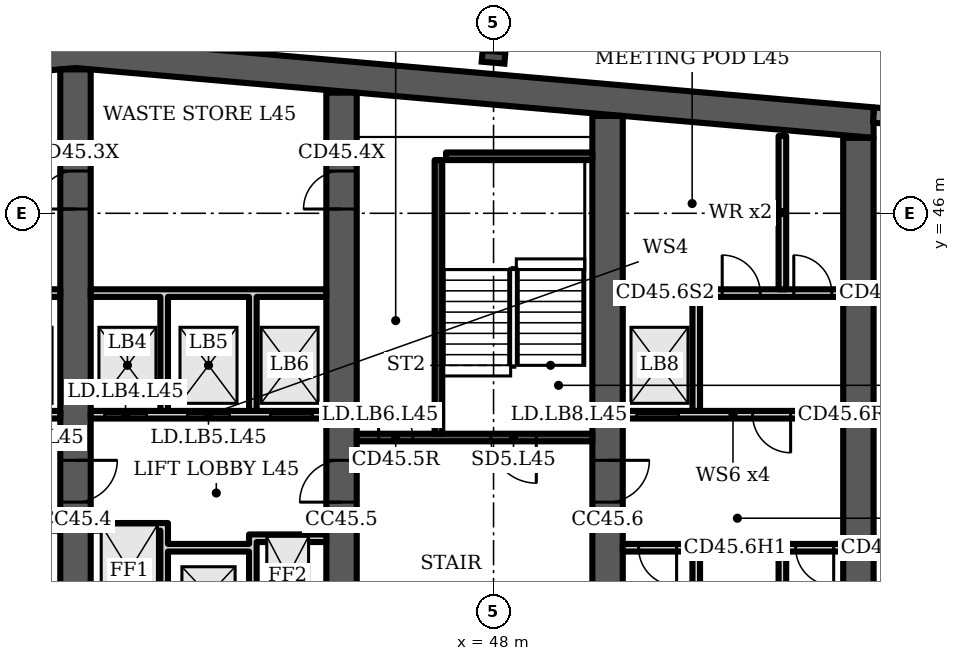
"""IFC4 building model, lengths in metres.
Left out: names, types, materials, properties, quantities, classifications, styles, units other than length and angle.
Written with IfcOpenShell. Run it as: python <this file> out.ifc"""

import sys

from ifc_helpers import new_model, si_unit, direction, frame, frame_2d, origin, origin_2d, place, context, subcontext, project, spatial, polyline, rectangle, i_section, outline, extrude, element, fill, save


model = new_model("IFC4")
c1 = context("Model", 3, precision=1e-05, world=origin(), true_north=direction((0.0, 1.0)))
c2 = subcontext(c1, "Body", "Model", "MODEL_VIEW")
j1 = project(units=[si_unit("LENGTHUNIT", "METRE"), si_unit("PLANEANGLEUNIT", "RADIAN")], contexts=[c1])
p1 = place(None, origin())
s1 = spatial("IfcSite", under=j1, at=p1, CompositionType="ELEMENT")
p2 = place(p1, origin())
s2 = spatial("IfcBuilding", under=s1, at=p2, CompositionType="ELEMENT")
p3 = place(p2, frame((0.0, 0.0, 184.3)))
s3 = spatial("IfcBuildingStorey", under=s2, at=p3, CompositionType="ELEMENT", Elevation=184.3)
p4 = place(p3, frame((0.0, 0.0, -0.0)))
e1 = element("IfcWall", 1, at=p4, inside=s3, PredefinedType="SHEAR", context=c2, shape_type="SweptSolid", body=[
    extrude(outline(polyline([(16.0, 47.984), (37.0, 49.822), (58.0, 47.984), (58.0, 48.787), (37.0, 50.625), (16.0, 48.787), (16.0, 47.984)])), origin(), (0.0, 0.0, 1.0), 3.6),
])
p5 = place(p3, frame((37.0, 34.8, 0.0), z_axis=(0.0, 0.0, 1.0), x_axis=(0.0, 1.0, 0.0)))
e2 = element("IfcWall", 2, at=p5, inside=s3, PredefinedType="SHEAR", context=c2, shape_type="SweptSolid", body=[
    extrude(rectangle(XDim=14.987, YDim=0.8, at=frame_2d((7.493, 0.0))), origin(), (0.0, 0.0, 1.0), 3.6),
])
p6 = place(p5, frame((11.312, 0.0, 0.0)))
e3 = element("IfcOpeningElement", 3, at=p6, cuts=e2, PredefinedType="OPENING", context=c2, shape_type="SweptSolid", body=[
    extrude(rectangle(XDim=1.0, YDim=2.1, at=frame_2d((0.5, 1.05))), frame((0.0, 0.41, 0.0), z_axis=(0.0, -1.0, 0.0), x_axis=(1.0, 0.0, 0.0)), (0.0, 0.0, 1.0), 0.82),
])
p7 = place(p5, frame((3.6, 0.0, 0.0)))
e4 = element("IfcOpeningElement", 4, at=p7, cuts=e2, PredefinedType="OPENING", context=c2, shape_type="SweptSolid", body=[
    extrude(rectangle(XDim=1.1, YDim=2.1, at=frame_2d((0.55, 1.05))), frame((0.0, 0.41, 0.0), z_axis=(0.0, -1.0, 0.0), x_axis=(1.0, 0.0, 0.0)), (0.0, 0.0, 1.0), 0.82),
])
p8 = place(p3, frame((44.0, 34.8, 0.0), z_axis=(0.0, 0.0, 1.0), x_axis=(0.0, 1.0, 0.0)))
e5 = element("IfcWall", 5, at=p8, inside=s3, PredefinedType="SHEAR", context=c2, shape_type="SweptSolid", body=[
    extrude(rectangle(XDim=14.374, YDim=0.8, at=frame_2d((7.187, 0.0))), origin(), (0.0, 0.0, 1.0), 3.6),
])
p9 = place(p8, frame((11.312, 0.0, 0.0)))
e6 = element("IfcOpeningElement", 6, at=p9, cuts=e5, PredefinedType="OPENING", context=c2, shape_type="SweptSolid", body=[
    extrude(rectangle(XDim=1.0, YDim=2.1, at=frame_2d((0.5, 1.05))), frame((0.0, 0.41, 0.0), z_axis=(0.0, -1.0, 0.0), x_axis=(1.0, 0.0, 0.0)), (0.0, 0.0, 1.0), 0.82),
])
p10 = place(p8, frame((3.6, 0.0, 0.0)))
e7 = element("IfcOpeningElement", 7, at=p10, cuts=e5, PredefinedType="OPENING", context=c2, shape_type="SweptSolid", body=[
    extrude(rectangle(XDim=1.1, YDim=2.1, at=frame_2d((0.55, 1.05))), frame((0.0, 0.41, 0.0), z_axis=(0.0, -1.0, 0.0), x_axis=(1.0, 0.0, 0.0)), (0.0, 0.0, 1.0), 0.82),
])
p11 = place(p3, frame((51.0, 34.8, 0.0), z_axis=(0.0, 0.0, 1.0), x_axis=(0.0, 1.0, 0.0)))
e8 = element("IfcWall", 8, at=p11, inside=s3, PredefinedType="SHEAR", context=c2, shape_type="SweptSolid", body=[
    extrude(rectangle(XDim=13.762, YDim=0.8, at=frame_2d((6.881, 0.0))), origin(), (0.0, 0.0, 1.0), 3.6),
])
p12 = place(p11, frame((3.6, 0.0, 0.0)))
e9 = element("IfcOpeningElement", 9, at=p12, cuts=e8, PredefinedType="OPENING", context=c2, shape_type="SweptSolid", body=[
    extrude(rectangle(XDim=1.1, YDim=2.1, at=frame_2d((0.55, 1.05))), frame((0.0, 0.41, 0.0), z_axis=(0.0, -1.0, 0.0), x_axis=(1.0, 0.0, 0.0)), (0.0, 0.0, 1.0), 0.82),
])
p13 = place(p3, frame((57.6, 34.8, 0.0), z_axis=(0.0, 0.0, 1.0), x_axis=(0.0, 1.0, 0.0)))
e10 = element("IfcWall", 10, at=p13, inside=s3, PredefinedType="SHEAR", context=c2, shape_type="SweptSolid", body=[
    extrude(rectangle(XDim=13.184, YDim=0.8, at=frame_2d((6.592, 0.0))), origin(), (0.0, 0.0, 1.0), 3.6),
])
p14 = place(p3, frame((48.0, 50.112, 0.0), z_axis=(0.0, 0.0, 1.0), x_axis=(0.087156, 0.996198, 0.0)))
e11 = element("IfcColumn", 11, at=p14, inside=s3, PredefinedType="COLUMN", context=c2, shape_type="SweptSolid", body=[
    extrude(i_section(OverallWidth=0.3, OverallDepth=0.6, WebThickness=0.015, FlangeThickness=0.03, FilletRadius=0.027, at=origin_2d()), origin(), (0.0, 0.0, 1.0), 3.6),
])
p15 = place(p3, frame((60.983, 48.326, 0.0), z_axis=(0.0, 0.0, 1.0), x_axis=(-0.996194, 0.087168, 0.0)))
e12 = element("IfcWall", 12, at=p15, inside=s3, PredefinedType="SOLIDWALL", context=c2, shape_type="SweptSolid", body=[
    extrude(rectangle(XDim=2.994, YDim=0.4, at=frame_2d((1.497, 0.0))), origin(), (0.0, 0.0, 1.0), 3.2),
])
p16 = place(p3, frame((30.4, 40.7, 0.0), z_axis=(0.0, 0.0, 1.0), x_axis=(1.0, 0.0, 0.0)))
e13 = element("IfcWall", 13, at=p16, inside=s3, PredefinedType="PARTITIONING", context=c2, shape_type="SweptSolid", body=[
    extrude(rectangle(XDim=6.2, YDim=0.2, at=frame_2d((3.1, 0.0))), origin(), (0.0, 0.0, 1.0), 3.2),
])
p17 = place(p16, frame((0.367, 0.0, 0.0)))
e14 = element("IfcOpeningElement", 14, at=p17, cuts=e13, PredefinedType="OPENING", context=c2, shape_type="SweptSolid", body=[
    extrude(rectangle(XDim=1.1, YDim=2.1, at=frame_2d((0.55, 1.05))), frame((0.0, 0.11, 0.0), z_axis=(0.0, -1.0, 0.0), x_axis=(1.0, 0.0, 0.0)), (0.0, 0.0, 1.0), 0.22),
])
p18 = place(p16, frame((2.55, 0.0, 0.0)))
e15 = element("IfcOpeningElement", 15, at=p18, cuts=e13, PredefinedType="OPENING", context=c2, shape_type="SweptSolid", body=[
    extrude(rectangle(XDim=1.1, YDim=2.1, at=frame_2d((0.55, 1.05))), frame((0.0, 0.11, 0.0), z_axis=(0.0, -1.0, 0.0), x_axis=(1.0, 0.0, 0.0)), (0.0, 0.0, 1.0), 0.22),
])
p19 = place(p16, frame((4.733, 0.0, 0.0)))
e16 = element("IfcOpeningElement", 16, at=p19, cuts=e13, PredefinedType="OPENING", context=c2, shape_type="SweptSolid", body=[
    extrude(rectangle(XDim=1.1, YDim=2.1, at=frame_2d((0.55, 1.05))), frame((0.0, 0.11, 0.0), z_axis=(0.0, -1.0, 0.0), x_axis=(1.0, 0.0, 0.0)), (0.0, 0.0, 1.0), 0.22),
])
p20 = place(p3, frame((0.0, 0.0, -0.0)))
e17 = element("IfcWall", 17, at=p20, inside=s3, PredefinedType="PARTITIONING", context=c2, shape_type="SweptSolid", body=[
    extrude(outline(polyline([(34.567, 37.85), (34.767, 37.85), (36.6, 37.85), (36.6, 37.65), (34.767, 37.65), (34.767, 34.8), (34.567, 34.8), (34.567, 37.85)])), origin(), (0.0, 0.0, 1.0), 3.2),
])
p21 = place(p3, frame((0.0, 0.0, -0.0)))
e18 = element("IfcWall", 18, at=p21, inside=s3, PredefinedType="PARTITIONING", context=c2, shape_type="SweptSolid", body=[
    extrude(outline(polyline([(32.433, 40.8), (32.233, 40.8), (32.233, 43.8), (30.4, 43.8), (30.4, 44.0), (36.6, 44.0), (36.6, 43.8), (34.767, 43.8), (34.767, 40.8), (34.567, 40.8), (34.567, 43.8), (32.433, 43.8), (32.433, 40.8)])), origin(), (0.0, 0.0, 1.0), 3.2),
])
p22 = place(p3, frame((37.4, 40.7, 0.0), z_axis=(0.0, 0.0, 1.0), x_axis=(1.0, 0.0, 0.0)))
e19 = element("IfcWall", 19, at=p22, inside=s3, PredefinedType="PARTITIONING", context=c2, shape_type="SweptSolid", body=[
    extrude(rectangle(XDim=6.2, YDim=0.2, at=frame_2d((3.1, 0.0))), origin(), (0.0, 0.0, 1.0), 3.2),
])
p23 = place(p22, frame((0.367, 0.0, 0.0)))
e20 = element("IfcOpeningElement", 20, at=p23, cuts=e19, PredefinedType="OPENING", context=c2, shape_type="SweptSolid", body=[
    extrude(rectangle(XDim=1.1, YDim=2.1, at=frame_2d((0.55, 1.05))), frame((0.0, 0.11, 0.0), z_axis=(0.0, -1.0, 0.0), x_axis=(1.0, 0.0, 0.0)), (0.0, 0.0, 1.0), 0.22),
])
p24 = place(p22, frame((2.55, 0.0, 0.0)))
e21 = element("IfcOpeningElement", 21, at=p24, cuts=e19, PredefinedType="OPENING", context=c2, shape_type="SweptSolid", body=[
    extrude(rectangle(XDim=1.1, YDim=2.1, at=frame_2d((0.55, 1.05))), frame((0.0, 0.11, 0.0), z_axis=(0.0, -1.0, 0.0), x_axis=(1.0, 0.0, 0.0)), (0.0, 0.0, 1.0), 0.22),
])
p25 = place(p22, frame((4.733, 0.0, 0.0)))
e22 = element("IfcOpeningElement", 22, at=p25, cuts=e19, PredefinedType="OPENING", context=c2, shape_type="SweptSolid", body=[
    extrude(rectangle(XDim=1.1, YDim=2.1, at=frame_2d((0.55, 1.05))), frame((0.0, 0.11, 0.0), z_axis=(0.0, -1.0, 0.0), x_axis=(1.0, 0.0, 0.0)), (0.0, 0.0, 1.0), 0.22),
])
p26 = place(p3, frame((0.0, 0.0, -0.0)))
e23 = element("IfcWall", 23, at=p26, inside=s3, PredefinedType="PARTITIONING", context=c2, shape_type="SweptSolid", body=[
    extrude(outline(polyline([(41.567, 37.1), (39.433, 37.1), (39.433, 34.8), (39.233, 34.8), (39.233, 37.65), (37.4, 37.65), (37.4, 37.85), (39.233, 37.85), (39.433, 37.85), (39.433, 37.3), (41.567, 37.3), (41.567, 37.55), (41.767, 37.55), (43.6, 37.55), (43.6, 37.35), (41.767, 37.35), (41.767, 34.8), (41.567, 34.8), (41.567, 37.1)])), origin(), (0.0, 0.0, 1.0), 3.2),
])
p27 = place(p3, frame((0.0, 0.0, -0.0)))
e24 = element("IfcWall", 24, at=p27, inside=s3, PredefinedType="PARTITIONING", context=c2, shape_type="SweptSolid", body=[
    extrude(outline(polyline([(39.433, 40.8), (39.233, 40.8), (39.233, 43.8), (37.4, 43.8), (37.4, 44.0), (43.6, 44.0), (43.6, 43.8), (41.767, 43.8), (41.767, 40.8), (41.567, 40.8), (41.567, 43.8), (39.433, 43.8), (39.433, 40.8)])), origin(), (0.0, 0.0, 1.0), 3.2),
])
p28 = place(p3, frame((44.4, 40.1, 0.0), z_axis=(0.0, 0.0, 1.0), x_axis=(1.0, 0.0, 0.0)))
e25 = element("IfcWall", 25, at=p28, inside=s3, PredefinedType="SHEAR", context=c2, shape_type="SweptSolid", body=[
    extrude(rectangle(XDim=6.2, YDim=0.2, at=frame_2d((3.1, 0.0))), origin(), (0.0, 0.0, 1.0), 3.2),
])
p29 = place(p28, frame((3.525, 0.0, 0.0)))
e26 = element("IfcOpeningElement", 26, at=p29, cuts=e25, PredefinedType="OPENING", context=c2, shape_type="SweptSolid", body=[
    extrude(rectangle(XDim=1.2, YDim=2.1, at=frame_2d((0.6, 1.05))), frame((0.0, 0.11, 0.0), z_axis=(0.0, -1.0, 0.0), x_axis=(1.0, 0.0, 0.0)), (0.0, 0.0, 1.0), 0.22),
])
p30 = place(p28, frame((0.575, 0.0, 0.0)))
e27 = element("IfcOpeningElement", 27, at=p30, cuts=e25, PredefinedType="OPENING", context=c2, shape_type="SweptSolid", body=[
    extrude(rectangle(XDim=0.9, YDim=2.1, at=frame_2d((0.45, 1.05))), frame((0.0, 0.11, 0.0), z_axis=(0.0, -1.0, 0.0), x_axis=(1.0, 0.0, 0.0)), (0.0, 0.0, 1.0), 0.22),
])
p31 = place(p3, frame((46.55, 40.2, 0.0), z_axis=(0.0, 0.0, 1.0), x_axis=(0.0, 1.0, 0.0)))
e28 = element("IfcWall", 28, at=p31, inside=s3, PredefinedType="SHEAR", context=c2, shape_type="SweptSolid", body=[
    extrude(rectangle(XDim=7.2, YDim=0.2, at=frame_2d((3.6, 0.0))), origin(), (0.0, 0.0, 1.0), 3.2),
])
p32 = place(p3, frame((46.75, 47.5, 0.0), z_axis=(0.0, 0.0, 1.0), x_axis=(1.0, 0.0, 0.0)))
e29 = element("IfcWall", 29, at=p32, inside=s3, PredefinedType="SHEAR", context=c2, shape_type="SweptSolid", body=[
    extrude(rectangle(XDim=3.85, YDim=0.2, at=frame_2d((1.925, 0.0))), origin(), (0.0, 0.0, 1.0), 3.2),
])
p33 = place(p3, frame((51.4, 37.2, 0.0), z_axis=(0.0, 0.0, 1.0), x_axis=(1.0, 0.0, 0.0)))
e30 = element("IfcWall", 30, at=p33, inside=s3, PredefinedType="PARTITIONING", context=c2, shape_type="SweptSolid", body=[
    extrude(rectangle(XDim=1.833, YDim=0.2, at=frame_2d((0.917, 0.0))), origin(), (0.0, 0.0, 1.0), 3.2),
])
p34 = place(p33, frame((0.417, 0.0, 0.0)))
e31 = element("IfcOpeningElement", 31, at=p34, cuts=e30, PredefinedType="OPENING", context=c2, shape_type="SweptSolid", body=[
    extrude(rectangle(XDim=1.0, YDim=2.1, at=frame_2d((0.5, 1.05))), frame((0.0, 0.11, 0.0), z_axis=(0.0, -1.0, 0.0), x_axis=(1.0, 0.0, 0.0)), (0.0, 0.0, 1.0), 0.22),
])
p35 = place(p3, frame((55.7, 37.2, 0.0), z_axis=(0.0, 0.0, 1.0), x_axis=(1.0, 0.0, 0.0)))
e32 = element("IfcWall", 32, at=p35, inside=s3, PredefinedType="PARTITIONING", context=c2, shape_type="SweptSolid", body=[
    extrude(rectangle(XDim=1.5, YDim=0.2, at=frame_2d((0.75, 0.0))), origin(), (0.0, 0.0, 1.0), 3.2),
])
p36 = place(p35, frame((0.25, 0.0, 0.0)))
e33 = element("IfcOpeningElement", 33, at=p36, cuts=e32, PredefinedType="OPENING", context=c2, shape_type="SweptSolid", body=[
    extrude(rectangle(XDim=1.0, YDim=2.1, at=frame_2d((0.5, 1.05))), frame((0.0, 0.11, 0.0), z_axis=(0.0, -1.0, 0.0), x_axis=(1.0, 0.0, 0.0)), (0.0, 0.0, 1.0), 0.22),
])
p37 = place(p3, frame((51.4, 40.7, 0.0), z_axis=(0.0, 0.0, 1.0), x_axis=(1.0, 0.0, 0.0)))
e34 = element("IfcWall", 34, at=p37, inside=s3, PredefinedType="PARTITIONING", context=c2, shape_type="SweptSolid", body=[
    extrude(rectangle(XDim=5.8, YDim=0.2, at=frame_2d((2.9, 0.0))), origin(), (0.0, 0.0, 1.0), 3.2),
])
p38 = place(p37, frame((0.367, 0.0, 0.0)))
e35 = element("IfcOpeningElement", 35, at=p38, cuts=e34, PredefinedType="OPENING", context=c2, shape_type="SweptSolid", body=[
    extrude(rectangle(XDim=1.1, YDim=2.1, at=frame_2d((0.55, 1.05))), frame((0.0, 0.11, 0.0), z_axis=(0.0, -1.0, 0.0), x_axis=(1.0, 0.0, 0.0)), (0.0, 0.0, 1.0), 0.22),
])
p39 = place(p37, frame((3.417, 0.0, 0.0)))
e36 = element("IfcOpeningElement", 36, at=p39, cuts=e34, PredefinedType="OPENING", context=c2, shape_type="SweptSolid", body=[
    extrude(rectangle(XDim=1.0, YDim=2.1, at=frame_2d((0.5, 1.05))), frame((0.0, 0.11, 0.0), z_axis=(0.0, -1.0, 0.0), x_axis=(1.0, 0.0, 0.0)), (0.0, 0.0, 1.0), 0.22),
])
p40 = place(p3, frame((51.4, 43.9, 0.0), z_axis=(0.0, 0.0, 1.0), x_axis=(1.0, 0.0, 0.0)))
e37 = element("IfcWall", 37, at=p40, inside=s3, PredefinedType="PARTITIONING", context=c2, shape_type="SweptSolid", body=[
    extrude(rectangle(XDim=5.8, YDim=0.2, at=frame_2d((2.9, 0.0))), origin(), (0.0, 0.0, 1.0), 3.2),
])
p41 = place(p40, frame((2.617, 0.0, 0.0)))
e38 = element("IfcOpeningElement", 38, at=p41, cuts=e37, PredefinedType="OPENING", context=c2, shape_type="SweptSolid", body=[
    extrude(rectangle(XDim=1.0, YDim=2.1, at=frame_2d((0.5, 1.05))), frame((0.0, 0.11, 0.0), z_axis=(0.0, -1.0, 0.0), x_axis=(1.0, 0.0, 0.0)), (0.0, 0.0, 1.0), 0.22),
])
p42 = place(p40, frame((4.5, 0.0, 0.0)))
e39 = element("IfcOpeningElement", 39, at=p42, cuts=e37, PredefinedType="OPENING", context=c2, shape_type="SweptSolid", body=[
    extrude(rectangle(XDim=1.0, YDim=2.1, at=frame_2d((0.5, 1.05))), frame((0.0, 0.11, 0.0), z_axis=(0.0, -1.0, 0.0), x_axis=(1.0, 0.0, 0.0)), (0.0, 0.0, 1.0), 0.22),
])
p43 = place(p3, frame((0.0, 0.0, -0.0)))
e40 = element("IfcWall", 40, at=p43, inside=s3, PredefinedType="PARTITIONING", context=c2, shape_type="SweptSolid", body=[
    extrude(outline(polyline([(53.233, 34.8), (53.233, 37.3), (53.433, 37.3), (53.433, 34.8), (53.233, 34.8)])), origin(), (0.0, 0.0, 1.0), 3.2),
])
p44 = place(p3, frame((0.0, 0.0, -0.0)))
e41 = element("IfcWall", 41, at=p44, inside=s3, PredefinedType="PARTITIONING", context=c2, shape_type="SweptSolid", body=[
    extrude(outline(polyline([(55.5, 34.8), (55.5, 37.3), (55.7, 37.3), (55.7, 34.8), (55.5, 34.8)])), origin(), (0.0, 0.0, 1.0), 3.2),
])
p45 = place(p3, frame((0.0, 0.0, -0.0)))
e42 = element("IfcWall", 42, at=p45, inside=s3, PredefinedType="PARTITIONING", context=c2, shape_type="SweptSolid", body=[
    extrude(outline(polyline([(53.433, 40.8), (53.433, 43.8), (53.233, 43.8), (53.233, 40.8), (53.433, 40.8)])), origin(), (0.0, 0.0, 1.0), 3.2),
])
p46 = place(p3, frame((55.6, 44.0, 0.0), z_axis=(0.0, 0.0, 1.0), x_axis=(0.0, 1.0, 0.0)))
e43 = element("IfcWall", 43, at=p46, inside=s3, PredefinedType="PARTITIONING", context=c2, shape_type="SweptSolid", body=[
    extrude(rectangle(XDim=4.034, YDim=0.2, at=frame_2d((2.017, 0.0))), origin(), (0.0, 0.0, 1.0), 3.2),
])
p47 = place(p6, origin())
e44 = element("IfcDoor", 44, at=p47, inside=s3, OperationType="SINGLE_SWING_LEFT", PredefinedType="DOOR", context=c2, shape_type="SweptSolid", body=[
    extrude(rectangle(XDim=1.0, YDim=2.1, at=frame_2d((0.5, 1.05))), frame((0.0, 0.4, 0.0), z_axis=(0.0, -1.0, 0.0), x_axis=(1.0, 0.0, 0.0)), (0.0, 0.0, 1.0), 0.8),
])
fill(e3, e44)
p48 = place(p23, origin())
e45 = element("IfcDoor", 45, at=p48, inside=s3, OperationType="DOUBLE_DOOR_SLIDING", PredefinedType="DOOR", context=c2, shape_type="SweptSolid", body=[
    extrude(rectangle(XDim=1.1, YDim=2.1, at=frame_2d((0.55, 1.05))), frame((0.0, 0.025, 0.0), z_axis=(0.0, -1.0, 0.0), x_axis=(1.0, 0.0, 0.0)), (0.0, 0.0, 1.0), 0.05),
])
fill(e20, e45)
p49 = place(p24, origin())
e46 = element("IfcDoor", 46, at=p49, inside=s3, OperationType="DOUBLE_DOOR_SLIDING", PredefinedType="DOOR", context=c2, shape_type="SweptSolid", body=[
    extrude(rectangle(XDim=1.1, YDim=2.1, at=frame_2d((0.55, 1.05))), frame((0.0, 0.025, 0.0), z_axis=(0.0, -1.0, 0.0), x_axis=(1.0, 0.0, 0.0)), (0.0, 0.0, 1.0), 0.05),
])
fill(e21, e46)
p50 = place(p25, origin())
e47 = element("IfcDoor", 47, at=p50, inside=s3, OperationType="DOUBLE_DOOR_SLIDING", PredefinedType="DOOR", context=c2, shape_type="SweptSolid", body=[
    extrude(rectangle(XDim=1.1, YDim=2.1, at=frame_2d((0.55, 1.05))), frame((0.0, 0.025, 0.0), z_axis=(0.0, -1.0, 0.0), x_axis=(1.0, 0.0, 0.0)), (0.0, 0.0, 1.0), 0.05),
])
fill(e22, e47)
p51 = place(p9, origin())
e48 = element("IfcDoor", 48, at=p51, inside=s3, OperationType="SINGLE_SWING_LEFT", PredefinedType="DOOR", context=c2, shape_type="SweptSolid", body=[
    extrude(rectangle(XDim=1.0, YDim=2.1, at=frame_2d((0.5, 1.05))), frame((0.0, 0.4, 0.0), z_axis=(0.0, -1.0, 0.0), x_axis=(1.0, 0.0, 0.0)), (0.0, 0.0, 1.0), 0.8),
])
fill(e6, e48)
p52 = place(p29, origin())
e49 = element("IfcDoor", 49, at=p52, inside=s3, OperationType="SINGLE_SWING_RIGHT", PredefinedType="DOOR", context=c2, shape_type="SweptSolid", body=[
    extrude(rectangle(XDim=1.2, YDim=2.1, at=frame_2d((0.6, 1.05))), frame((0.0, 0.025, 0.0), z_axis=(0.0, -1.0, 0.0), x_axis=(1.0, 0.0, 0.0)), (0.0, 0.0, 1.0), 0.05),
])
fill(e26, e49)
p53 = place(p30, origin())
e50 = element("IfcDoor", 50, at=p53, inside=s3, OperationType="SINGLE_SWING_LEFT", PredefinedType="DOOR", context=c2, shape_type="SweptSolid", body=[
    extrude(rectangle(XDim=0.9, YDim=2.1, at=frame_2d((0.45, 1.05))), frame((0.0, 0.025, 0.0), z_axis=(0.0, -1.0, 0.0), x_axis=(1.0, 0.0, 0.0)), (0.0, 0.0, 1.0), 0.05),
])
fill(e27, e50)
p54 = place(p34, origin())
e51 = element("IfcDoor", 51, at=p54, inside=s3, OperationType="SINGLE_SWING_RIGHT", PredefinedType="DOOR", context=c2, shape_type="SweptSolid", body=[
    extrude(rectangle(XDim=1.0, YDim=2.1, at=frame_2d((0.5, 1.05))), frame((0.0, 0.025, 0.0), z_axis=(0.0, -1.0, 0.0), x_axis=(1.0, 0.0, 0.0)), (0.0, 0.0, 1.0), 0.05),
])
fill(e31, e51)
p55 = place(p36, origin())
e52 = element("IfcDoor", 52, at=p55, inside=s3, OperationType="SINGLE_SWING_RIGHT", PredefinedType="DOOR", context=c2, shape_type="SweptSolid", body=[
    extrude(rectangle(XDim=1.0, YDim=2.1, at=frame_2d((0.5, 1.05))), frame((0.0, 0.025, 0.0), z_axis=(0.0, -1.0, 0.0), x_axis=(1.0, 0.0, 0.0)), (0.0, 0.0, 1.0), 0.05),
])
fill(e33, e52)
p56 = place(p38, origin())
e53 = element("IfcDoor", 53, at=p56, inside=s3, OperationType="DOUBLE_DOOR_SLIDING", PredefinedType="DOOR", context=c2, shape_type="SweptSolid", body=[
    extrude(rectangle(XDim=1.1, YDim=2.1, at=frame_2d((0.55, 1.05))), frame((0.0, 0.025, 0.0), z_axis=(0.0, -1.0, 0.0), x_axis=(1.0, 0.0, 0.0)), (0.0, 0.0, 1.0), 0.05),
])
fill(e35, e53)
p57 = place(p39, origin())
e54 = element("IfcDoor", 54, at=p57, inside=s3, OperationType="SINGLE_SWING_RIGHT", PredefinedType="DOOR", context=c2, shape_type="SweptSolid", body=[
    extrude(rectangle(XDim=1.0, YDim=2.1, at=frame_2d((0.5, 1.05))), frame((0.0, 0.025, 0.0), z_axis=(0.0, -1.0, 0.0), x_axis=(1.0, 0.0, 0.0)), (0.0, 0.0, 1.0), 0.05),
])
fill(e36, e54)
p58 = place(p41, origin())
e55 = element("IfcDoor", 55, at=p58, inside=s3, OperationType="SINGLE_SWING_LEFT", PredefinedType="DOOR", context=c2, shape_type="SweptSolid", body=[
    extrude(rectangle(XDim=1.0, YDim=2.1, at=frame_2d((0.5, 1.05))), frame((0.0, 0.025, 0.0), z_axis=(0.0, -1.0, 0.0), x_axis=(1.0, 0.0, 0.0)), (0.0, 0.0, 1.0), 0.05),
])
fill(e38, e55)
p59 = place(p42, origin())
e56 = element("IfcDoor", 56, at=p59, inside=s3, OperationType="SINGLE_SWING_LEFT", PredefinedType="DOOR", context=c2, shape_type="SweptSolid", body=[
    extrude(rectangle(XDim=1.0, YDim=2.1, at=frame_2d((0.5, 1.05))), frame((0.0, 0.025, 0.0), z_axis=(0.0, -1.0, 0.0), x_axis=(1.0, 0.0, 0.0)), (0.0, 0.0, 1.0), 0.05),
])
fill(e39, e56)
p60 = place(p7, origin())
e57 = element("IfcDoor", 57, at=p60, inside=s3, OperationType="SINGLE_SWING_RIGHT", PredefinedType="DOOR", context=c2, shape_type="SweptSolid", body=[
    extrude(rectangle(XDim=1.1, YDim=2.1, at=frame_2d((0.55, 1.05))), frame((0.0, 0.025, 0.0), z_axis=(0.0, -1.0, 0.0), x_axis=(1.0, 0.0, 0.0)), (0.0, 0.0, 1.0), 0.05),
])
fill(e4, e57)
p61 = place(p10, origin())
e58 = element("IfcDoor", 58, at=p61, inside=s3, OperationType="SINGLE_SWING_LEFT", PredefinedType="DOOR", context=c2, shape_type="SweptSolid", body=[
    extrude(rectangle(XDim=1.1, YDim=2.1, at=frame_2d((0.55, 1.05))), frame((0.0, 0.025, 0.0), z_axis=(0.0, -1.0, 0.0), x_axis=(1.0, 0.0, 0.0)), (0.0, 0.0, 1.0), 0.05),
])
fill(e7, e58)
p62 = place(p12, origin())
e59 = element("IfcDoor", 59, at=p62, inside=s3, OperationType="SINGLE_SWING_RIGHT", PredefinedType="DOOR", context=c2, shape_type="SweptSolid", body=[
    extrude(rectangle(XDim=1.1, YDim=2.1, at=frame_2d((0.55, 1.05))), frame((0.0, 0.025, 0.0), z_axis=(0.0, -1.0, 0.0), x_axis=(1.0, 0.0, 0.0)), (0.0, 0.0, 1.0), 0.05),
])
fill(e9, e59)
save(model, sys.argv[1])
